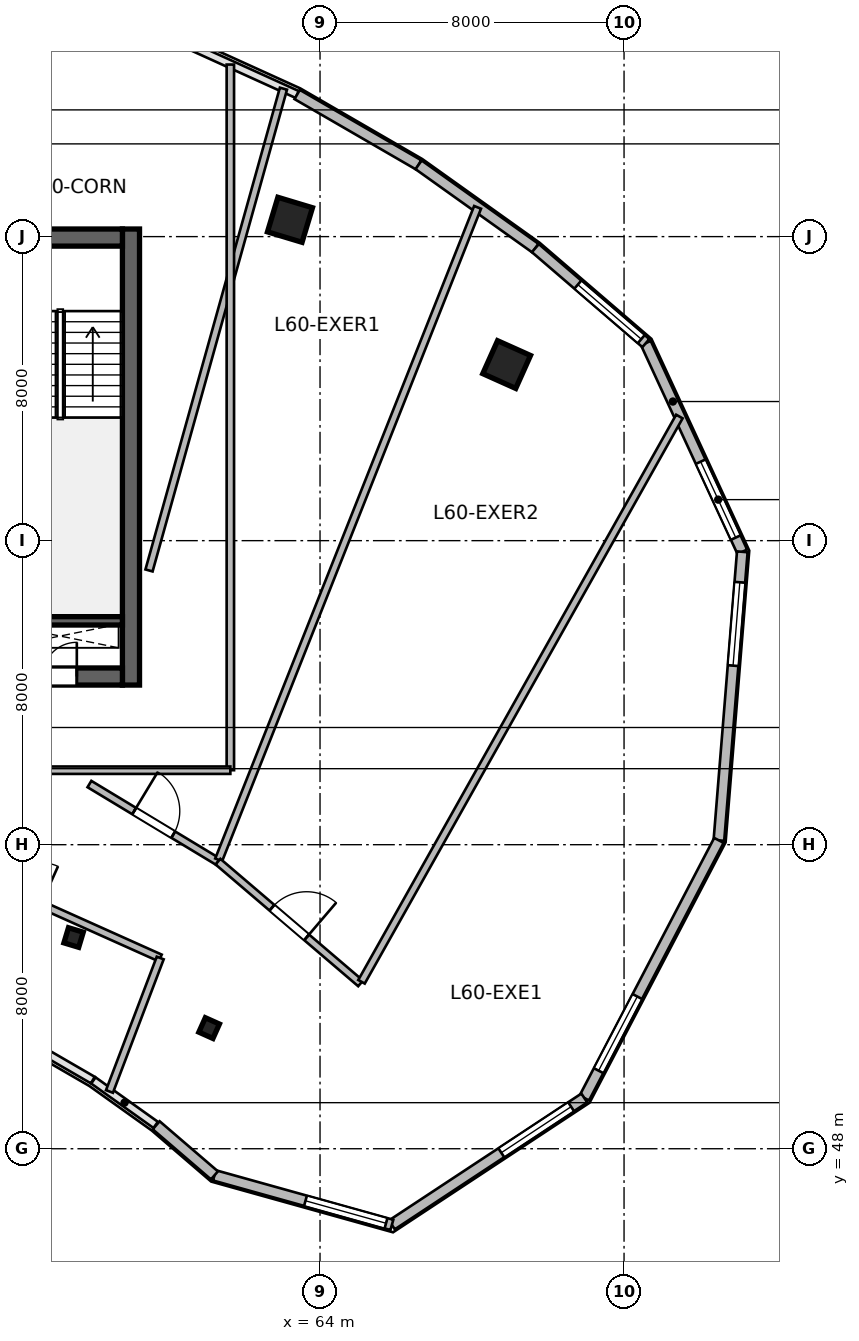
"""IFC4 building model, lengths in metres.
Left out: names, types, materials, properties, quantities, classifications, styles, units other than length and angle.
Written with IfcOpenShell. Run it as: python <this file> out.ifc"""

import sys

from ifc_helpers import new_model, si_unit, direction, frame, frame_2d, origin, origin_2d, place, context, subcontext, project, spatial, rectangle, i_section, extrude, source, transform, mapped, element, fill, save


model = new_model("IFC4")
c1 = context("Model", 3, precision=1e-05, world=origin(), true_north=direction((0.0, 1.0)))
c2 = subcontext(c1, "Body", "Model", "MODEL_VIEW")
j1 = project(units=[si_unit("LENGTHUNIT", "METRE"), si_unit("PLANEANGLEUNIT", "RADIAN")], contexts=[c1])
p1 = place(None, origin())
s1 = spatial("IfcSite", under=j1, at=p1, CompositionType="ELEMENT")
p2 = place(p1, origin())
s2 = spatial("IfcBuilding", under=s1, at=p2, CompositionType="ELEMENT")
p3 = place(p2, frame((0.0, 0.0, 246.9)))
s3 = spatial("IfcBuildingStorey", under=s2, at=p3, CompositionType="ELEMENT", Elevation=246.9)
m1 = source(origin(), c2, "Body", "SweptSolid", [
    extrude(rectangle(XDim=12.0, YDim=0.45, at=frame_2d((6.0, 0.0))), origin(), (0.0, 0.0, 1.0), 3.9),
])
p4 = place(p3, frame((59.025, 60.2, 0.0), z_axis=(0.0, 0.0, 1.0), x_axis=(0.0, 1.0, 0.0)))
e1 = element("IfcWall", 1, at=p4, inside=s3, PredefinedType="SHEAR", context=c2, shape_type="MappedRepresentation", body=[
    mapped(m1, transform((0.0, 0.0, 0.0), scale=1.0)),
])
m2 = source(origin(), c2, "Body", "SweptSolid", [
    extrude(rectangle(XDim=21.6, YDim=0.45, at=frame_2d((10.8, 0.0))), origin(), (0.0, 0.0, 1.0), 3.9),
])
p5 = place(p3, frame((37.2, 60.425, 0.0), z_axis=(0.0, 0.0, 1.0), x_axis=(1.0, 0.0, 0.0)))
e2 = element("IfcWall", 2, at=p5, inside=s3, PredefinedType="SHEAR", context=c2, shape_type="MappedRepresentation", body=[
    mapped(m2, transform((0.0, 0.0, 0.0), scale=1.0)),
])
p6 = place(p5, frame((1.1, 0.0, 0.0)))
e3 = element("IfcOpeningElement", 3, at=p6, cuts=e2, PredefinedType="OPENING", context=c2, shape_type="SweptSolid", body=[
    extrude(rectangle(XDim=1.15, YDim=2.15, at=frame_2d((0.575, 1.075))), frame((0.0, 0.235, 0.0), z_axis=(0.0, -1.0, 0.0), x_axis=(1.0, 0.0, 0.0)), (0.0, 0.0, 1.0), 0.47),
])
p7 = place(p5, frame((19.5, 0.0, 0.0)))
e4 = element("IfcOpeningElement", 4, at=p7, cuts=e2, PredefinedType="OPENING", context=c2, shape_type="SweptSolid", body=[
    extrude(rectangle(XDim=0.9, YDim=2.1, at=frame_2d((0.45, 1.05))), frame((0.0, 0.235, 0.0), z_axis=(0.0, -1.0, 0.0), x_axis=(1.0, 0.0, 0.0)), (0.0, 0.0, 1.0), 0.47),
])
p8 = place(p5, frame((12.02, 0.0, 0.0)))
e5 = element("IfcOpeningElement", 5, at=p8, cuts=e2, PredefinedType="OPENING", context=c2, shape_type="SweptSolid", body=[
    extrude(rectangle(XDim=1.6, YDim=2.15, at=frame_2d((0.8, 1.075))), frame((0.0, 0.235, 0.0), z_axis=(0.0, -1.0, 0.0), x_axis=(1.0, 0.0, 0.0)), (0.0, 0.0, 1.0), 0.47),
])
p9 = place(p3, frame((37.2, 71.975, 0.0), z_axis=(0.0, 0.0, 1.0), x_axis=(1.0, 0.0, 0.0)))
e6 = element("IfcWall", 6, at=p9, inside=s3, PredefinedType="SHEAR", context=c2, shape_type="MappedRepresentation", body=[
    mapped(m2, transform((0.0, 0.0, 0.0), scale=1.0)),
])
p10 = place(p9, frame((1.2, 0.0, 0.0)))
e7 = element("IfcOpeningElement", 7, at=p10, cuts=e6, PredefinedType="OPENING", context=c2, shape_type="SweptSolid", body=[
    extrude(rectangle(XDim=0.9, YDim=2.1, at=frame_2d((0.45, 1.05))), frame((0.0, 0.235, 0.0), z_axis=(0.0, -1.0, 0.0), x_axis=(1.0, 0.0, 0.0)), (0.0, 0.0, 1.0), 0.47),
])
p11 = place(p9, frame((14.7, 0.0, 0.0)))
e8 = element("IfcOpeningElement", 8, at=p11, cuts=e6, PredefinedType="OPENING", context=c2, shape_type="SweptSolid", body=[
    extrude(rectangle(XDim=1.2, YDim=2.15, at=frame_2d((0.6, 1.075))), frame((0.0, 0.235, 0.0), z_axis=(0.0, -1.0, 0.0), x_axis=(1.0, 0.0, 0.0)), (0.0, 0.0, 1.0), 0.47),
])
p12 = place(p9, frame((4.15, 0.0, 0.0)))
e9 = element("IfcOpeningElement", 9, at=p12, cuts=e6, PredefinedType="OPENING", context=c2, shape_type="SweptSolid", body=[
    extrude(rectangle(XDim=1.3, YDim=2.15, at=frame_2d((0.65, 1.075))), frame((0.0, 0.235, 0.0), z_axis=(0.0, -1.0, 0.0), x_axis=(1.0, 0.0, 0.0)), (0.0, 0.0, 1.0), 0.47),
])
p13 = place(p9, frame((7.25, 0.0, 0.0)))
e10 = element("IfcOpeningElement", 10, at=p13, cuts=e6, PredefinedType="OPENING", context=c2, shape_type="SweptSolid", body=[
    extrude(rectangle(XDim=0.9, YDim=2.1, at=frame_2d((0.45, 1.05))), frame((0.0, 0.235, 0.0), z_axis=(0.0, -1.0, 0.0), x_axis=(1.0, 0.0, 0.0)), (0.0, 0.0, 1.0), 0.47),
])
m3 = source(origin(), c2, "Body", "SweptSolid", [
    extrude(rectangle(XDim=3.27, YDim=0.22, at=frame_2d((1.635, 0.0))), origin(), (0.0, 0.0, 1.0), 3.9),
])
p14 = place(p3, frame((55.53, 61.89, 0.0), z_axis=(0.0, 0.0, 1.0), x_axis=(1.0, 0.0, 0.0)))
e11 = element("IfcWall", 11, at=p14, inside=s3, PredefinedType="SHEAR", context=c2, shape_type="MappedRepresentation", body=[
    mapped(m3, transform((0.0, 0.0, 0.0), scale=1.0)),
])
m4 = source(origin(), c2, "Body", "SweptSolid", [
    extrude(i_section(OverallWidth=0.406, OverallDepth=0.416, WebThickness=0.03, FlangeThickness=0.048, at=origin_2d()), origin(), (0.0, 0.0, 1.0), 3.9),
])
p15 = place(p3, frame((57.515, 53.558, 0.0), z_axis=(0.0, 0.0, 1.0), x_axis=(0.288697611798, 0.957420330337, 0.0)))
e12 = element("IfcColumn", 12, at=p15, inside=s3, PredefinedType="COLUMN", context=c2, shape_type="MappedRepresentation", body=[
    mapped(m4, transform((0.0, 0.0, 0.0), scale=1.0)),
])
m5 = source(origin(), c2, "Body", "SweptSolid", [
    extrude(rectangle(XDim=0.95, YDim=0.95, at=origin_2d()), origin(), (0.0, 0.0, 1.0), 3.9),
])
p16 = place(p3, frame((63.209, 72.442, 0.0), z_axis=(0.0, 0.0, 1.0), x_axis=(0.288697611798, 0.957420330337, 0.0)))
e13 = element("IfcColumn", 13, at=p16, inside=s3, PredefinedType="COLUMN", context=c2, shape_type="MappedRepresentation", body=[
    mapped(m5, transform((0.0, 0.0, 0.0), scale=1.0)),
])
p17 = place(p3, frame((61.082, 51.175, 0.0), z_axis=(0.0, 0.0, 1.0), x_axis=(0.409126902895, 0.912477494148, 0.0)))
e14 = element("IfcColumn", 14, at=p17, inside=s3, PredefinedType="COLUMN", context=c2, shape_type="MappedRepresentation", body=[
    mapped(m4, transform((0.0, 0.0, 0.0), scale=1.0)),
])
p18 = place(p3, frame((68.91, 68.633, 0.0), z_axis=(0.0, 0.0, 1.0), x_axis=(0.409126902895, 0.912477494148, 0.0)))
e15 = element("IfcColumn", 15, at=p18, inside=s3, PredefinedType="COLUMN", context=c2, shape_type="MappedRepresentation", body=[
    mapped(m5, transform((0.0, 0.0, 0.0), scale=1.0)),
])
m6 = source(origin(), c2, "Body", "SweptSolid", [
    extrude(rectangle(XDim=6.05, YDim=0.28, at=frame_2d((3.025, 0.0))), origin(), (0.0, 0.0, 1.0), 3.65),
])
p19 = place(p3, frame((72.574, 69.198, 0.0), z_axis=(0.0, 0.0, 1.0), x_axis=(0.41942922905, -0.907788037935, 0.0)))
e16 = element("IfcWall", 16, at=p19, inside=s3, PredefinedType="SOLIDWALL", context=c2, shape_type="MappedRepresentation", body=[
    mapped(m6, transform((0.0, 0.0, 0.0), scale=1.0)),
])
p20 = place(p19, frame((3.437, 0.0, 0.95)))
e17 = element("IfcOpeningElement", 17, at=p20, cuts=e16, PredefinedType="OPENING", context=c2, shape_type="SweptSolid", body=[
    extrude(rectangle(XDim=2.2, YDim=2.1, at=frame_2d((1.1, 1.05))), frame((0.0, 0.15, 0.0), z_axis=(0.0, -1.0, 0.0), x_axis=(1.0, 0.0, 0.0)), (0.0, 0.0, 1.0), 0.3),
])
m7 = source(origin(), c2, "Body", "SweptSolid", [
    extrude(rectangle(XDim=7.618, YDim=0.28, at=frame_2d((3.809, 0.0))), origin(), (0.0, 0.0, 1.0), 3.65),
])
p21 = place(p3, frame((75.112, 63.707, 0.0), z_axis=(0.0, 0.0, 1.0), x_axis=(-0.080820171031, -0.996728699273, 0.0)))
e18 = element("IfcWall", 18, at=p21, inside=s3, PredefinedType="SOLIDWALL", context=c2, shape_type="MappedRepresentation", body=[
    mapped(m7, transform((0.0, 0.0, 0.0), scale=1.0)),
])
p22 = place(p21, frame((0.805, 0.0, 0.95)))
e19 = element("IfcOpeningElement", 19, at=p22, cuts=e18, PredefinedType="OPENING", context=c2, shape_type="SweptSolid", body=[
    extrude(rectangle(XDim=2.2, YDim=2.1, at=frame_2d((1.1, 1.05))), frame((0.0, 0.15, 0.0), z_axis=(0.0, -1.0, 0.0), x_axis=(1.0, 0.0, 0.0)), (0.0, 0.0, 1.0), 0.3),
])
m8 = source(origin(), c2, "Body", "SweptSolid", [
    extrude(rectangle(XDim=7.648, YDim=0.28, at=frame_2d((3.824, 0.0))), origin(), (0.0, 0.0, 1.0), 3.65),
])
p23 = place(p3, frame((74.496, 56.113, 0.0), z_axis=(0.0, 0.0, 1.0), x_axis=(-0.463116873665, -0.886297219519, 0.0)))
e20 = element("IfcWall", 20, at=p23, inside=s3, PredefinedType="SOLIDWALL", context=c2, shape_type="MappedRepresentation", body=[
    mapped(m8, transform((0.0, 0.0, 0.0), scale=1.0)),
])
p24 = place(p23, frame((4.636, 0.0, 0.95)))
e21 = element("IfcOpeningElement", 21, at=p24, cuts=e20, PredefinedType="OPENING", context=c2, shape_type="SweptSolid", body=[
    extrude(rectangle(XDim=2.2, YDim=2.1, at=frame_2d((1.1, 1.05))), frame((0.0, 0.15, 0.0), z_axis=(0.0, -1.0, 0.0), x_axis=(1.0, 0.0, 0.0)), (0.0, 0.0, 1.0), 0.3),
])
m9 = source(origin(), c2, "Body", "SweptSolid", [
    extrude(rectangle(XDim=6.065, YDim=0.28, at=frame_2d((3.033, 0.0))), origin(), (0.0, 0.0, 1.0), 3.65),
])
p25 = place(p3, frame((70.954, 49.335, 0.0), z_axis=(0.0, 0.0, 1.0), x_axis=(-0.834857303202, -0.550466423399, 0.0)))
e22 = element("IfcWall", 22, at=p25, inside=s3, PredefinedType="SOLIDWALL", context=c2, shape_type="MappedRepresentation", body=[
    mapped(m9, transform((0.0, 0.0, 0.0), scale=1.0)),
])
p26 = place(p25, frame((0.416, 0.0, 0.95)))
e23 = element("IfcOpeningElement", 23, at=p26, cuts=e22, PredefinedType="OPENING", context=c2, shape_type="SweptSolid", body=[
    extrude(rectangle(XDim=2.2, YDim=2.1, at=frame_2d((1.1, 1.05))), frame((0.0, 0.15, 0.0), z_axis=(0.0, -1.0, 0.0), x_axis=(1.0, 0.0, 0.0)), (0.0, 0.0, 1.0), 0.3),
])
m10 = source(origin(), c2, "Body", "SweptSolid", [
    extrude(rectangle(XDim=4.847, YDim=0.28, at=frame_2d((2.424, 0.0))), origin(), (0.0, 0.0, 1.0), 3.65),
])
p27 = place(p3, frame((65.891, 45.996, 0.0), z_axis=(0.0, 0.0, 1.0), x_axis=(-0.963208430762, 0.268755500238, 0.0)))
e24 = element("IfcWall", 24, at=p27, inside=s3, PredefinedType="SOLIDWALL", context=c2, shape_type="MappedRepresentation", body=[
    mapped(m10, transform((0.0, 0.0, 0.0), scale=1.0)),
])
p28 = place(p27, frame((0.16, 0.0, 0.95)))
e25 = element("IfcOpeningElement", 25, at=p28, cuts=e24, PredefinedType="OPENING", context=c2, shape_type="SweptSolid", body=[
    extrude(rectangle(XDim=2.2, YDim=2.1, at=frame_2d((1.1, 1.05))), frame((0.0, 0.15, 0.0), z_axis=(0.0, -1.0, 0.0), x_axis=(1.0, 0.0, 0.0)), (0.0, 0.0, 1.0), 0.3),
])
m11 = source(origin(), c2, "Body", "SweptSolid", [
    extrude(rectangle(XDim=2.022, YDim=0.28, at=frame_2d((1.011, 0.0))), origin(), (0.0, 0.0, 1.0), 3.65),
])
p29 = place(p3, frame((61.222, 47.299, 0.0), z_axis=(0.0, 0.0, 1.0), x_axis=(-0.758343943716, 0.651854633358, 0.0)))
e26 = element("IfcWall", 26, at=p29, inside=s3, PredefinedType="SOLIDWALL", context=c2, shape_type="MappedRepresentation", body=[
    mapped(m11, transform((0.0, 0.0, 0.0), scale=1.0)),
])
m12 = source(origin(), c2, "Body", "SweptSolid", [
    extrude(rectangle(XDim=3.692, YDim=0.28, at=frame_2d((1.846, 0.0))), origin(), (0.0, 0.0, 1.0), 3.65),
])
p30 = place(p3, frame((63.398, 75.74, 0.0), z_axis=(0.0, 0.0, 1.0), x_axis=(0.86534327136, -0.501179631181, 0.0)))
e27 = element("IfcWall", 27, at=p30, inside=s3, PredefinedType="SOLIDWALL", context=c2, shape_type="MappedRepresentation", body=[
    mapped(m12, transform((0.0, 0.0, 0.0), scale=1.0)),
])
m13 = source(origin(), c2, "Body", "SweptSolid", [
    extrude(rectangle(XDim=3.775, YDim=0.28, at=frame_2d((1.888, 0.0))), origin(), (0.0, 0.0, 1.0), 3.65),
])
p31 = place(p3, frame((66.593, 73.889, 0.0), z_axis=(0.0, 0.0, 1.0), x_axis=(0.814135281578, -0.580675247699, 0.0)))
e28 = element("IfcWall", 28, at=p31, inside=s3, PredefinedType="SOLIDWALL", context=c2, shape_type="MappedRepresentation", body=[
    mapped(m13, transform((0.0, 0.0, 0.0), scale=1.0)),
])
m14 = source(origin(), c2, "Body", "SweptSolid", [
    extrude(rectangle(XDim=3.834, YDim=0.28, at=frame_2d((1.917, 0.0))), origin(), (0.0, 0.0, 1.0), 3.65),
])
p32 = place(p3, frame((69.667, 71.697, 0.0), z_axis=(0.0, 0.0, 1.0), x_axis=(0.75839292431, -0.651797646787, 0.0)))
e29 = element("IfcWall", 29, at=p32, inside=s3, PredefinedType="SOLIDWALL", context=c2, shape_type="MappedRepresentation", body=[
    mapped(m14, transform((0.0, 0.0, 0.0), scale=1.0)),
])
p33 = place(p32, frame((1.474, 0.0, 0.95)))
e30 = element("IfcOpeningElement", 30, at=p33, cuts=e29, PredefinedType="OPENING", context=c2, shape_type="SweptSolid", body=[
    extrude(rectangle(XDim=2.2, YDim=2.1, at=frame_2d((1.1, 1.05))), frame((0.0, 0.15, 0.0), z_axis=(0.0, -1.0, 0.0), x_axis=(1.0, 0.0, 0.0)), (0.0, 0.0, 1.0), 0.3),
])
m15 = source(origin(), c2, "Body", "SweptSolid", [
    extrude(rectangle(XDim=7.982, YDim=0.195, at=frame_2d((3.991, 0.0))), origin(), (0.0, 0.0, 1.0), 3.65),
])
p34 = place(p3, frame((52.511, 56.284, 0.0), z_axis=(0.0, 0.0, 1.0), x_axis=(0.91248609472, -0.409107720464, 0.0)))
e31 = element("IfcWall", 31, at=p34, inside=s3, PredefinedType="PARTITIONING", context=c2, shape_type="MappedRepresentation", body=[
    mapped(m15, transform((0.0, 0.0, 0.0), scale=1.0)),
])
p35 = place(p34, frame((3.441, 0.0, 0.0)))
e32 = element("IfcOpeningElement", 32, at=p35, cuts=e31, PredefinedType="OPENING", context=c2, shape_type="SweptSolid", body=[
    extrude(rectangle(XDim=1.1, YDim=2.15, at=frame_2d((0.55, 1.075))), frame((0.0, 0.107, 0.0), z_axis=(0.0, -1.0, 0.0), x_axis=(1.0, 0.0, 0.0)), (0.0, 0.0, 1.0), 0.215),
])
m16 = source(origin(), c2, "Body", "SweptSolid", [
    extrude(rectangle(XDim=3.757, YDim=0.195, at=frame_2d((1.879, 0.0))), origin(), (0.0, 0.0, 1.0), 3.65),
])
p36 = place(p3, frame((58.459, 49.507, 0.0), z_axis=(0.0, 0.0, 1.0), x_axis=(0.355427833237, 0.93470372598, 0.0)))
e33 = element("IfcWall", 33, at=p36, inside=s3, PredefinedType="PARTITIONING", context=c2, shape_type="MappedRepresentation", body=[
    mapped(m16, transform((0.0, 0.0, 0.0), scale=1.0)),
])
m17 = source(origin(), c2, "Body", "SweptSolid", [
    extrude(rectangle(XDim=3.951, YDim=0.195, at=frame_2d((1.975, 0.0))), origin(), (0.0, 0.0, 1.0), 3.65),
])
p37 = place(p3, frame((57.932, 57.596, 0.0), z_axis=(0.0, 0.0, 1.0), x_axis=(0.856137696849, -0.51674775668, 0.0)))
e34 = element("IfcWall", 34, at=p37, inside=s3, PredefinedType="PARTITIONING", context=c2, shape_type="MappedRepresentation", body=[
    mapped(m17, transform((0.0, 0.0, 0.0), scale=1.0)),
])
p38 = place(p37, frame((1.375, 0.0, 0.0)))
e35 = element("IfcOpeningElement", 35, at=p38, cuts=e34, PredefinedType="OPENING", context=c2, shape_type="SweptSolid", body=[
    extrude(rectangle(XDim=1.2, YDim=2.15, at=frame_2d((0.6, 1.075))), frame((0.0, 0.107, 0.0), z_axis=(0.0, -1.0, 0.0), x_axis=(1.0, 0.0, 0.0)), (0.0, 0.0, 1.0), 0.215),
])
m18 = source(origin(), c2, "Body", "SweptSolid", [
    extrude(rectangle(XDim=13.161, YDim=0.195, at=frame_2d((6.581, 0.0))), origin(), (0.0, 0.0, 1.0), 3.65),
])
p39 = place(p3, frame((59.5, 63.216, 0.0), z_axis=(0.0, 0.0, 1.0), x_axis=(0.268752541286, 0.963209256368, 0.0)))
e36 = element("IfcWall", 36, at=p39, inside=s3, PredefinedType="PARTITIONING", context=c2, shape_type="MappedRepresentation", body=[
    mapped(m18, transform((0.0, 0.0, 0.0), scale=1.0)),
])
m19 = source(origin(), c2, "Body", "SweptSolid", [
    extrude(rectangle(XDim=18.471, YDim=0.195, at=frame_2d((9.235, 0.0))), origin(), (0.0, 0.0, 1.0), 3.65),
])
p40 = place(p3, frame((61.333, 55.602, 0.0), z_axis=(0.0, 0.0, 1.0), x_axis=(0.368827756565, 0.929497760076, 0.0)))
e37 = element("IfcWall", 37, at=p40, inside=s3, PredefinedType="PARTITIONING", context=c2, shape_type="MappedRepresentation", body=[
    mapped(m19, transform((0.0, 0.0, 0.0), scale=1.0)),
])
m20 = source(origin(), c2, "Body", "SweptSolid", [
    extrude(rectangle(XDim=4.935, YDim=0.195, at=frame_2d((2.467, 0.0))), origin(), (0.0, 0.0, 1.0), 3.65),
])
p41 = place(p3, frame((61.314, 55.554, 0.0), z_axis=(0.0, 0.0, 1.0), x_axis=(0.760547222161, -0.649282621716, 0.0)))
e38 = element("IfcWall", 38, at=p41, inside=s3, PredefinedType="PARTITIONING", context=c2, shape_type="MappedRepresentation", body=[
    mapped(m20, transform((0.0, 0.0, 0.0), scale=1.0)),
])
p42 = place(p41, frame((1.867, 0.0, 0.0)))
e39 = element("IfcOpeningElement", 39, at=p42, cuts=e38, PredefinedType="OPENING", context=c2, shape_type="SweptSolid", body=[
    extrude(rectangle(XDim=1.2, YDim=2.15, at=frame_2d((0.6, 1.075))), frame((0.0, 0.107, 0.0), z_axis=(0.0, -1.0, 0.0), x_axis=(1.0, 0.0, 0.0)), (0.0, 0.0, 1.0), 0.215),
])
m21 = source(origin(), c2, "Body", "SweptSolid", [
    extrude(rectangle(XDim=17.064, YDim=0.195, at=frame_2d((8.532, 0.0))), origin(), (0.0, 0.0, 1.0), 3.65),
])
p43 = place(p3, frame((65.092, 52.393, 0.0), z_axis=(0.0, 0.0, 1.0), x_axis=(0.490167496501, 0.871628261, 0.0)))
e40 = element("IfcWall", 40, at=p43, inside=s3, PredefinedType="PARTITIONING", context=c2, shape_type="MappedRepresentation", body=[
    mapped(m21, transform((0.0, 0.0, 0.0), scale=1.0)),
])
m22 = source(origin(), c2, "Body", "SweptSolid", [
    extrude(rectangle(XDim=18.567, YDim=0.195, at=frame_2d((9.284, 0.0))), origin(), (0.0, 0.0, 1.0), 3.65),
])
p44 = place(p3, frame((61.64, 57.96, 0.0), z_axis=(0.0, 0.0, 1.0), x_axis=(0.0, 1.0, 0.0)))
e41 = element("IfcWall", 41, at=p44, inside=s3, PredefinedType="PARTITIONING", context=c2, shape_type="MappedRepresentation", body=[
    mapped(m22, transform((0.0, 0.0, 0.0), scale=1.0)),
])
m23 = source(origin(), c2, "Body", "SweptSolid", [
    extrude(rectangle(XDim=12.39, YDim=0.195, at=frame_2d((6.195, 0.0))), origin(), (0.0, 0.0, 1.0), 3.65),
])
p45 = place(p3, frame((49.25, 57.96, 0.0), z_axis=(0.0, 0.0, 1.0), x_axis=(1.0, 0.0, 0.0)))
e42 = element("IfcWall", 42, at=p45, inside=s3, PredefinedType="PARTITIONING", context=c2, shape_type="MappedRepresentation", body=[
    mapped(m23, transform((0.0, 0.0, 0.0), scale=1.0)),
])
m24 = source(origin(), c2, "Body", "SweptSolid", [
    extrude(rectangle(XDim=2.2, YDim=2.1, at=frame_2d((1.1, 1.05))), frame((0.0, 0.03, 0.0), z_axis=(0.0, -1.0, 0.0), x_axis=(1.0, 0.0, 0.0)), (0.0, 0.0, 1.0), 0.06),
])
p46 = place(p20, origin())
e43 = element("IfcWindow", 43, at=p46, inside=s3, PartitioningType="TRIPLE_PANEL_VERTICAL", PredefinedType="WINDOW", context=c2, shape_type="MappedRepresentation", body=[
    mapped(m24, transform((0.0, 0.0, 0.0), scale=1.0)),
])
fill(e17, e43)
p47 = place(p22, origin())
e44 = element("IfcWindow", 44, at=p47, inside=s3, PartitioningType="TRIPLE_PANEL_VERTICAL", PredefinedType="WINDOW", context=c2, shape_type="MappedRepresentation", body=[
    mapped(m24, transform((0.0, 0.0, 0.0), scale=1.0)),
])
fill(e19, e44)
p48 = place(p24, origin())
e45 = element("IfcWindow", 45, at=p48, inside=s3, PartitioningType="TRIPLE_PANEL_VERTICAL", PredefinedType="WINDOW", context=c2, shape_type="MappedRepresentation", body=[
    mapped(m24, transform((0.0, 0.0, 0.0), scale=1.0)),
])
fill(e21, e45)
p49 = place(p26, origin())
e46 = element("IfcWindow", 46, at=p49, inside=s3, PartitioningType="TRIPLE_PANEL_VERTICAL", PredefinedType="WINDOW", context=c2, shape_type="MappedRepresentation", body=[
    mapped(m24, transform((0.0, 0.0, 0.0), scale=1.0)),
])
fill(e23, e46)
p50 = place(p28, origin())
e47 = element("IfcWindow", 47, at=p50, inside=s3, PartitioningType="TRIPLE_PANEL_VERTICAL", PredefinedType="WINDOW", context=c2, shape_type="MappedRepresentation", body=[
    mapped(m24, transform((0.0, 0.0, 0.0), scale=1.0)),
])
fill(e25, e47)
p51 = place(p33, origin())
e48 = element("IfcWindow", 48, at=p51, inside=s3, PartitioningType="TRIPLE_PANEL_VERTICAL", PredefinedType="WINDOW", context=c2, shape_type="MappedRepresentation", body=[
    mapped(m24, transform((0.0, 0.0, 0.0), scale=1.0)),
])
fill(e30, e48)
m25 = source(origin(), c2, "Body", "SweptSolid", [
    extrude(rectangle(XDim=0.9, YDim=2.1, at=frame_2d((0.45, 1.05))), frame((0.0, 0.025, 0.0), z_axis=(0.0, -1.0, 0.0), x_axis=(1.0, 0.0, 0.0)), (0.0, 0.0, 1.0), 0.05),
])
p52 = place(p7, origin())
e49 = element("IfcDoor", 49, at=p52, inside=s3, OperationType="SINGLE_SWING_RIGHT", PredefinedType="DOOR", context=c2, shape_type="MappedRepresentation", body=[
    mapped(m25, transform((0.0, 0.0, 0.0), scale=1.0)),
])
fill(e4, e49)
m26 = source(origin(), c2, "Body", "SweptSolid", [
    extrude(rectangle(XDim=1.2, YDim=2.15, at=frame_2d((0.6, 1.075))), frame((0.0, 0.025, 0.0), z_axis=(0.0, -1.0, 0.0), x_axis=(1.0, 0.0, 0.0)), (0.0, 0.0, 1.0), 0.05),
])
p53 = place(p38, origin())
e50 = element("IfcDoor", 50, at=p53, inside=s3, OperationType="SINGLE_SWING_LEFT", PredefinedType="DOOR", context=c2, shape_type="MappedRepresentation", body=[
    mapped(m26, transform((0.0, 0.0, 0.0), scale=1.0)),
])
fill(e35, e50)
p54 = place(p42, origin())
e51 = element("IfcDoor", 51, at=p54, inside=s3, OperationType="SINGLE_SWING_RIGHT", PredefinedType="DOOR", context=c2, shape_type="MappedRepresentation", body=[
    mapped(m26, transform((0.0, 0.0, 0.0), scale=1.0)),
])
fill(e39, e51)
save(model, sys.argv[1])
